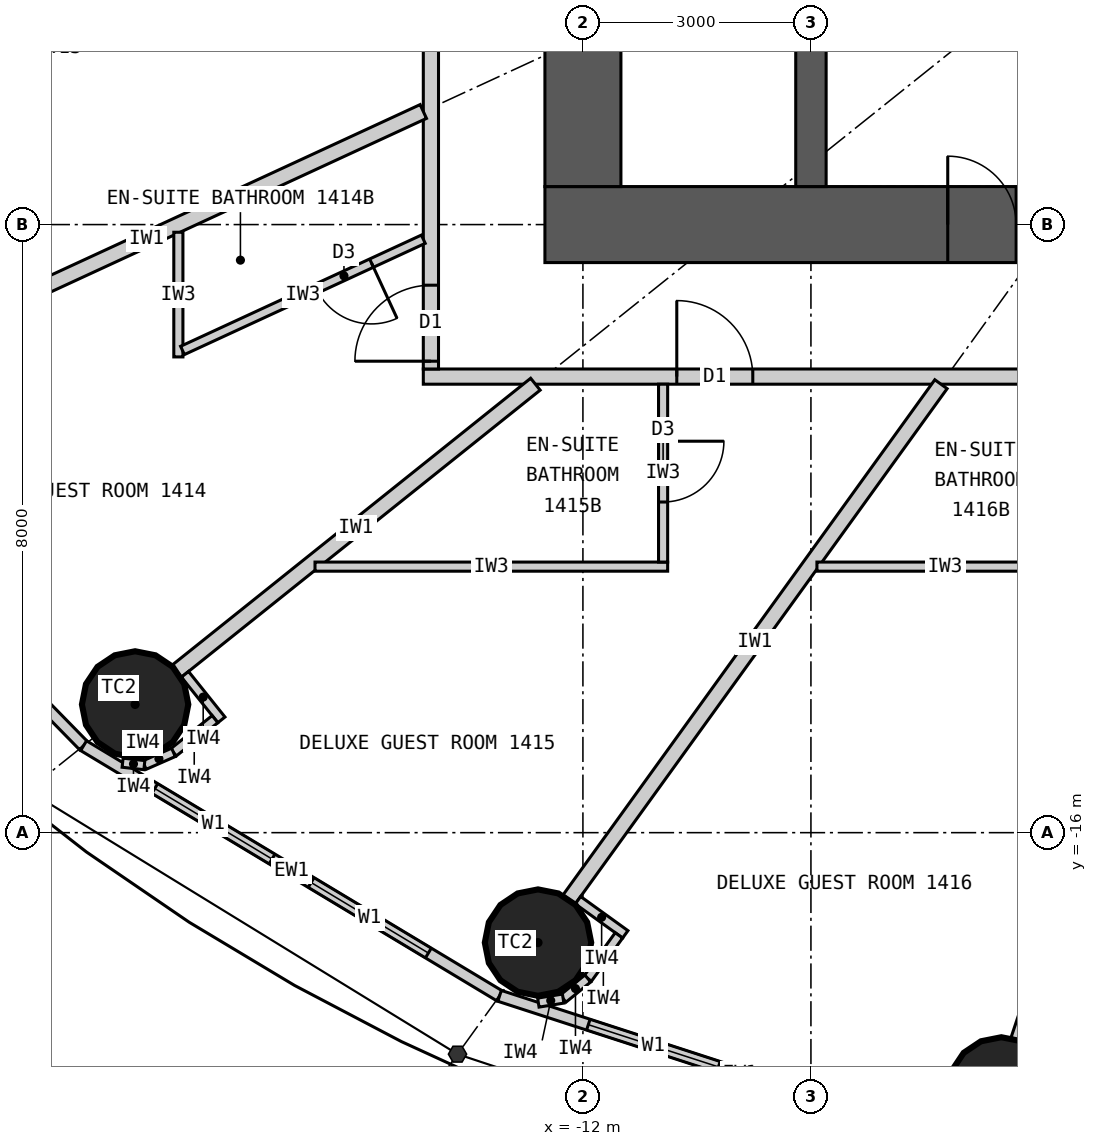
"""IFC4 building model, lengths in metres.
Left out: names, types, materials, properties, quantities, classifications, styles, units other than length and angle.
Written with IfcOpenShell. Run it as: python <this file> out.ifc"""

import sys

from ifc_helpers import new_model, si_unit, direction, frame, frame_2d, origin, origin_2d, place, context, subcontext, project, spatial, rectangle, circle, extrude, element, fill, save


model = new_model("IFC4")
c1 = context("Model", 3, precision=1e-05, world=origin(), true_north=direction((0.0, 1.0)))
c2 = subcontext(c1, "Body", "Model", "MODEL_VIEW")
j1 = project(units=[si_unit("LENGTHUNIT", "METRE"), si_unit("PLANEANGLEUNIT", "RADIAN")], contexts=[c1])
p1 = place(None, origin())
s1 = spatial("IfcSite", under=j1, at=p1, CompositionType="ELEMENT")
p2 = place(p1, origin())
s2 = spatial("IfcBuilding", under=s1, at=p2, CompositionType="ELEMENT")
p3 = place(p2, frame((0.0, 0.0, 60.6)))
s3 = spatial("IfcBuildingStorey", under=s2, at=p3, CompositionType="ELEMENT", Elevation=60.6)
for number, where, z_axis, x_axis in (
    (1, (-17.892, -14.313, 0.0), (0.0, 0.0, 1.0), (1.0, 0.0, 0.0)),
    (2, (-12.591, -17.447, 0.0), (0.0, 0.0, 1.0), (1.0, 0.0, 0.0)),
    (3, (-6.495, -19.391, 0.0), (0.0, 0.0, 1.0), (1.0, 0.0, 0.0)),
):
    element("IfcColumn", number, at=place(p3, frame(where, z_axis=z_axis, x_axis=x_axis)), inside=s3, PredefinedType="COLUMN", context=c2, shape_type="SweptSolid", body=[
        extrude(circle(Radius=0.7, at=origin_2d()), origin(), (0.0, 0.0, 1.0), 3.3),
    ])
p4 = place(p3, frame((12.5, -8.0, 0.0), z_axis=(0.0, 0.0, 1.0), x_axis=(-1.0, 0.0, 0.0)))
e4 = element("IfcWall", 4, at=p4, inside=s3, PredefinedType="SHEAR", context=c2, shape_type="SweptSolid", body=[
    extrude(rectangle(XDim=25.0, YDim=1.0, at=frame_2d((12.5, 0.0))), origin(), (0.0, 0.0, 1.0), 3.3),
])
p5 = place(p4, frame((11.2, 0.0, 0.0)))
e5 = element("IfcOpeningElement", 5, at=p5, cuts=e4, PredefinedType="OPENING", context=c2, shape_type="SweptSolid", body=[
    extrude(rectangle(XDim=1.2, YDim=2.2, at=frame_2d((0.6, 1.1))), frame((0.0, 0.51, 0.0), z_axis=(0.0, -1.0, 0.0), x_axis=(1.0, 0.0, 0.0)), (0.0, 0.0, 1.0), 1.02),
])
p6 = place(p4, frame((18.8, 0.0, 0.0)))
e6 = element("IfcOpeningElement", 6, at=p6, cuts=e4, PredefinedType="OPENING", context=c2, shape_type="SweptSolid", body=[
    extrude(rectangle(XDim=0.9, YDim=2.2, at=frame_2d((0.45, 1.1))), frame((0.0, 0.51, 0.0), z_axis=(0.0, -1.0, 0.0), x_axis=(1.0, 0.0, 0.0)), (0.0, 0.0, 1.0), 1.02),
])
p7 = place(p3, frame((-12.0, 7.5, 0.0), z_axis=(0.0, 0.0, 1.0), x_axis=(0.0, -1.0, 0.0)))
e7 = element("IfcWall", 7, at=p7, inside=s3, PredefinedType="SHEAR", context=c2, shape_type="SweptSolid", body=[
    extrude(rectangle(XDim=15.0, YDim=1.0, at=frame_2d((7.5, 0.0))), origin(), (0.0, 0.0, 1.0), 3.3),
])
p8 = place(p7, frame((6.6, 0.0, 0.0)))
e8 = element("IfcOpeningElement", 8, at=p8, cuts=e7, PredefinedType="OPENING", context=c2, shape_type="SweptSolid", body=[
    extrude(rectangle(XDim=1.8, YDim=2.2, at=frame_2d((0.9, 1.1))), frame((0.0, 0.51, 0.0), z_axis=(0.0, -1.0, 0.0), x_axis=(1.0, 0.0, 0.0)), (0.0, 0.0, 1.0), 1.02),
])
p9 = place(p3, frame((-9.0, -7.5, 0.0), z_axis=(0.0, 0.0, 1.0), x_axis=(0.0, 1.0, 0.0)))
e9 = element("IfcWall", 9, at=p9, inside=s3, PredefinedType="SHEAR", context=c2, shape_type="SweptSolid", body=[
    extrude(rectangle(XDim=3.0, YDim=0.4, at=frame_2d((1.5, 0.0))), origin(), (0.0, 0.0, 1.0), 3.3),
])
p10 = place(p3, frame((-22.803, -10.532, 0.0), z_axis=(0.0, 0.0, 1.0), x_axis=(0.699602905915, -0.714531856557, 0.0)))
e10 = element("IfcWall", 10, at=p10, inside=s3, PredefinedType="ELEMENTEDWALL", context=c2, shape_type="SweptSolid", body=[
    extrude(rectangle(XDim=6.051, YDim=0.15, at=frame_2d((3.025, 0.0))), origin(), (0.0, 0.0, 1.0), 3.12),
])
p11 = place(p10, frame((0.926, 0.0, 0.9)))
e11 = element("IfcOpeningElement", 11, at=p11, cuts=e10, PredefinedType="OPENING", context=c2, shape_type="SweptSolid", body=[
    extrude(rectangle(XDim=1.8, YDim=1.9, at=frame_2d((0.9, 0.95))), frame((0.0, 0.085, 0.0), z_axis=(0.0, -1.0, 0.0), x_axis=(1.0, 0.0, 0.0)), (0.0, 0.0, 1.0), 0.17),
])
p12 = place(p10, frame((3.325, 0.0, 0.9)))
e12 = element("IfcOpeningElement", 12, at=p12, cuts=e10, PredefinedType="OPENING", context=c2, shape_type="SweptSolid", body=[
    extrude(rectangle(XDim=1.8, YDim=1.9, at=frame_2d((0.9, 0.95))), frame((0.0, 0.085, 0.0), z_axis=(0.0, -1.0, 0.0), x_axis=(1.0, 0.0, 0.0)), (0.0, 0.0, 1.0), 0.17),
])
p13 = place(p3, frame((-18.57, -14.856, 0.0), z_axis=(0.0, 0.0, 1.0), x_axis=(0.856983180864, -0.515344377787, 0.0)))
e13 = element("IfcWall", 13, at=p13, inside=s3, PredefinedType="ELEMENTEDWALL", context=c2, shape_type="SweptSolid", body=[
    extrude(rectangle(XDim=6.386, YDim=0.15, at=frame_2d((3.193, 0.0))), origin(), (0.0, 0.0, 1.0), 3.12),
])
p14 = place(p13, frame((1.093, 0.0, 0.9)))
e14 = element("IfcOpeningElement", 14, at=p14, cuts=e13, PredefinedType="OPENING", context=c2, shape_type="SweptSolid", body=[
    extrude(rectangle(XDim=1.8, YDim=1.9, at=frame_2d((0.9, 0.95))), frame((0.0, 0.085, 0.0), z_axis=(0.0, -1.0, 0.0), x_axis=(1.0, 0.0, 0.0)), (0.0, 0.0, 1.0), 0.17),
])
p15 = place(p13, frame((3.493, 0.0, 0.9)))
e15 = element("IfcOpeningElement", 15, at=p15, cuts=e13, PredefinedType="OPENING", context=c2, shape_type="SweptSolid", body=[
    extrude(rectangle(XDim=1.8, YDim=1.9, at=frame_2d((0.9, 0.95))), frame((0.0, 0.085, 0.0), z_axis=(0.0, -1.0, 0.0), x_axis=(1.0, 0.0, 0.0)), (0.0, 0.0, 1.0), 0.17),
])
p16 = place(p3, frame((-13.096, -18.147, 0.0), z_axis=(0.0, 0.0, 1.0), x_axis=(0.951137534625, -0.308767534285, 0.0)))
e16 = element("IfcWall", 16, at=p16, inside=s3, PredefinedType="ELEMENTEDWALL", context=c2, shape_type="SweptSolid", body=[
    extrude(rectangle(XDim=6.655, YDim=0.15, at=frame_2d((3.328, 0.0))), origin(), (0.0, 0.0, 1.0), 3.12),
])
p17 = place(p16, frame((1.228, 0.0, 0.9)))
e17 = element("IfcOpeningElement", 17, at=p17, cuts=e16, PredefinedType="OPENING", context=c2, shape_type="SweptSolid", body=[
    extrude(rectangle(XDim=1.8, YDim=1.9, at=frame_2d((0.9, 0.95))), frame((0.0, 0.085, 0.0), z_axis=(0.0, -1.0, 0.0), x_axis=(1.0, 0.0, 0.0)), (0.0, 0.0, 1.0), 0.17),
])
p18 = place(p16, frame((3.628, 0.0, 0.9)))
e18 = element("IfcOpeningElement", 18, at=p18, cuts=e16, PredefinedType="OPENING", context=c2, shape_type="SweptSolid", body=[
    extrude(rectangle(XDim=1.8, YDim=1.9, at=frame_2d((0.9, 0.95))), frame((0.0, 0.085, 0.0), z_axis=(0.0, -1.0, 0.0), x_axis=(1.0, 0.0, 0.0)), (0.0, 0.0, 1.0), 0.17),
])
p19 = place(p3, frame((14.1, -10.0, 0.0), z_axis=(0.0, 0.0, 1.0), x_axis=(-1.0, 0.0, 0.0)))
e19 = element("IfcWall", 19, at=p19, inside=s3, PredefinedType="PARTITIONING", context=c2, shape_type="SweptSolid", body=[
    extrude(rectangle(XDim=28.2, YDim=0.2, at=frame_2d((14.1, 0.0))), origin(), (0.0, 0.0, 1.0), 3.12),
])
p20 = place(p19, frame((23.865, 0.0, 0.0)))
e20 = element("IfcOpeningElement", 20, at=p20, cuts=e19, PredefinedType="OPENING", context=c2, shape_type="SweptSolid", body=[
    extrude(rectangle(XDim=1.0, YDim=2.2, at=frame_2d((0.5, 1.1))), frame((0.0, 0.11, 0.0), z_axis=(0.0, -1.0, 0.0), x_axis=(1.0, 0.0, 0.0)), (0.0, 0.0, 1.0), 0.22),
])
p21 = place(p19, frame((18.529, 0.0, 0.0)))
e21 = element("IfcOpeningElement", 21, at=p21, cuts=e19, PredefinedType="OPENING", context=c2, shape_type="SweptSolid", body=[
    extrude(rectangle(XDim=1.0, YDim=2.2, at=frame_2d((0.5, 1.1))), frame((0.0, 0.11, 0.0), z_axis=(0.0, -1.0, 0.0), x_axis=(1.0, 0.0, 0.0)), (0.0, 0.0, 1.0), 0.22),
])
p22 = place(p19, frame((14.623, 0.0, 0.0)))
e22 = element("IfcOpeningElement", 22, at=p22, cuts=e19, PredefinedType="OPENING", context=c2, shape_type="SweptSolid", body=[
    extrude(rectangle(XDim=1.0, YDim=2.2, at=frame_2d((0.5, 1.1))), frame((0.0, 0.11, 0.0), z_axis=(0.0, -1.0, 0.0), x_axis=(1.0, 0.0, 0.0)), (0.0, 0.0, 1.0), 0.22),
])
p23 = place(p19, frame((11.24, 0.0, 0.0)))
e23 = element("IfcOpeningElement", 23, at=p23, cuts=e19, PredefinedType="OPENING", context=c2, shape_type="SweptSolid", body=[
    extrude(rectangle(XDim=1.0, YDim=2.2, at=frame_2d((0.5, 1.1))), frame((0.0, 0.11, 0.0), z_axis=(0.0, -1.0, 0.0), x_axis=(1.0, 0.0, 0.0)), (0.0, 0.0, 1.0), 0.22),
])
p24 = place(p19, frame((8.671, 0.0, 0.0)))
e24 = element("IfcOpeningElement", 24, at=p24, cuts=e19, PredefinedType="OPENING", context=c2, shape_type="SweptSolid", body=[
    extrude(rectangle(XDim=1.0, YDim=2.2, at=frame_2d((0.5, 1.1))), frame((0.0, 0.11, 0.0), z_axis=(0.0, -1.0, 0.0), x_axis=(1.0, 0.0, 0.0)), (0.0, 0.0, 1.0), 0.22),
])
p25 = place(p19, frame((2.801, 0.0, 0.0)))
e25 = element("IfcOpeningElement", 25, at=p25, cuts=e19, PredefinedType="OPENING", context=c2, shape_type="SweptSolid", body=[
    extrude(rectangle(XDim=1.0, YDim=2.2, at=frame_2d((0.5, 1.1))), frame((0.0, 0.11, 0.0), z_axis=(0.0, -1.0, 0.0), x_axis=(1.0, 0.0, 0.0)), (0.0, 0.0, 1.0), 0.22),
])
p26 = place(p3, frame((-14.0, 9.9, 0.0), z_axis=(0.0, 0.0, 1.0), x_axis=(0.0, -1.0, 0.0)))
e26 = element("IfcWall", 26, at=p26, inside=s3, PredefinedType="PARTITIONING", context=c2, shape_type="SweptSolid", body=[
    extrude(rectangle(XDim=19.8, YDim=0.2, at=frame_2d((9.9, 0.0))), origin(), (0.0, 0.0, 1.0), 3.12),
])
p27 = place(p26, frame((0.103, 0.0, 0.0)))
e27 = element("IfcOpeningElement", 27, at=p27, cuts=e26, PredefinedType="OPENING", context=c2, shape_type="SweptSolid", body=[
    extrude(rectangle(XDim=1.0, YDim=2.2, at=frame_2d((0.5, 1.1))), frame((0.0, 0.11, 0.0), z_axis=(0.0, -1.0, 0.0), x_axis=(1.0, 0.0, 0.0)), (0.0, 0.0, 1.0), 0.22),
])
p28 = place(p26, frame((5.248, 0.0, 0.0)))
e28 = element("IfcOpeningElement", 28, at=p28, cuts=e26, PredefinedType="OPENING", context=c2, shape_type="SweptSolid", body=[
    extrude(rectangle(XDim=1.0, YDim=2.2, at=frame_2d((0.5, 1.1))), frame((0.0, 0.11, 0.0), z_axis=(0.0, -1.0, 0.0), x_axis=(1.0, 0.0, 0.0)), (0.0, 0.0, 1.0), 0.22),
])
p29 = place(p26, frame((9.438, 0.0, 0.0)))
e29 = element("IfcOpeningElement", 29, at=p29, cuts=e26, PredefinedType="OPENING", context=c2, shape_type="SweptSolid", body=[
    extrude(rectangle(XDim=1.0, YDim=2.2, at=frame_2d((0.5, 1.1))), frame((0.0, 0.11, 0.0), z_axis=(0.0, -1.0, 0.0), x_axis=(1.0, 0.0, 0.0)), (0.0, 0.0, 1.0), 0.22),
])
p30 = place(p26, frame((13.942, 0.0, 0.0)))
e30 = element("IfcOpeningElement", 30, at=p30, cuts=e26, PredefinedType="OPENING", context=c2, shape_type="SweptSolid", body=[
    extrude(rectangle(XDim=1.0, YDim=2.2, at=frame_2d((0.5, 1.1))), frame((0.0, 0.11, 0.0), z_axis=(0.0, -1.0, 0.0), x_axis=(1.0, 0.0, 0.0)), (0.0, 0.0, 1.0), 0.22),
])
p31 = place(p26, frame((18.698, 0.0, 0.0)))
e31 = element("IfcOpeningElement", 31, at=p31, cuts=e26, PredefinedType="OPENING", context=c2, shape_type="SweptSolid", body=[
    extrude(rectangle(XDim=1.0, YDim=2.2, at=frame_2d((0.5, 1.1))), frame((0.0, 0.11, 0.0), z_axis=(0.0, -1.0, 0.0), x_axis=(1.0, 0.0, 0.0)), (0.0, 0.0, 1.0), 0.22),
])
p32 = place(p3, frame((-14.1, -6.512, 0.0), z_axis=(0.0, 0.0, 1.0), x_axis=(-0.907832871056, -0.419332181247, 0.0)))
e32 = element("IfcWall", 32, at=p32, inside=s3, PredefinedType="PARTITIONING", context=c2, shape_type="SweptSolid", body=[
    extrude(rectangle(XDim=8.023, YDim=0.2, at=frame_2d((4.011, 0.0))), origin(), (0.0, 0.0, 1.0), 2.32),
])
p33 = place(p3, frame((-12.625, -10.1, 0.0), z_axis=(0.0, 0.0, 1.0), x_axis=(-0.780892451574, -0.624665493744, 0.0)))
e33 = element("IfcWall", 33, at=p33, inside=s3, PredefinedType="PARTITIONING", context=c2, shape_type="SweptSolid", body=[
    extrude(rectangle(XDim=6.045, YDim=0.2, at=frame_2d((3.022, 0.0))), origin(), (0.0, 0.0, 1.0), 2.32),
])
p34 = place(p3, frame((-7.289, -10.1, 0.0), z_axis=(0.0, 0.0, 1.0), x_axis=(-0.585198353053, -0.810890182197, 0.0)))
e34 = element("IfcWall", 34, at=p34, inside=s3, PredefinedType="PARTITIONING", context=c2, shape_type="SweptSolid", body=[
    extrude(rectangle(XDim=8.36, YDim=0.2, at=frame_2d((4.18, 0.0))), origin(), (0.0, 0.0, 1.0), 2.32),
])
p35 = place(p3, frame((-3.383, -10.1, 0.0), z_axis=(0.0, 0.0, 1.0), x_axis=(-0.31759592231, -0.948226149256, 0.0)))
e35 = element("IfcWall", 35, at=p35, inside=s3, PredefinedType="PARTITIONING", context=c2, shape_type="SweptSolid", body=[
    extrude(rectangle(XDim=9.098, YDim=0.2, at=frame_2d((4.549, 0.0))), origin(), (0.0, 0.0, 1.0), 2.32),
])
p36 = place(p3, frame((-17.323, -8.101, 0.0), z_axis=(0.0, 0.0, 1.0), x_axis=(0.0, -1.0, 0.0)))
e36 = element("IfcWall", 36, at=p36, inside=s3, PredefinedType="PARTITIONING", context=c2, shape_type="SweptSolid", body=[
    extrude(rectangle(XDim=1.64, YDim=0.12, at=frame_2d((0.82, 0.0))), origin(), (0.0, 0.0, 1.0), 3.12),
])
p37 = place(p3, frame((-14.1, -8.193, 0.0), z_axis=(0.0, 0.0, 1.0), x_axis=(-0.907836493557, -0.419324338628, 0.0)))
e37 = element("IfcWall", 37, at=p37, inside=s3, PredefinedType="PARTITIONING", context=c2, shape_type="SweptSolid", body=[
    extrude(rectangle(XDim=3.49, YDim=0.12, at=frame_2d((1.745, 0.0))), origin(), (0.0, 0.0, 1.0), 3.12),
])
p38 = place(p37, frame((0.75, 0.0, 0.0)))
e38 = element("IfcOpeningElement", 38, at=p38, cuts=e37, PredefinedType="OPENING", context=c2, shape_type="SweptSolid", body=[
    extrude(rectangle(XDim=0.8, YDim=2.1, at=frame_2d((0.4, 1.05))), frame((0.0, 0.07, 0.0), z_axis=(0.0, -1.0, 0.0), x_axis=(1.0, 0.0, 0.0)), (0.0, 0.0, 1.0), 0.14),
])
p39 = place(p3, frame((-15.525, -12.5, 0.0), z_axis=(0.0, 0.0, 1.0), x_axis=(1.0, 0.0, 0.0)))
e39 = element("IfcWall", 39, at=p39, inside=s3, PredefinedType="PARTITIONING", context=c2, shape_type="SweptSolid", body=[
    extrude(rectangle(XDim=4.64, YDim=0.12, at=frame_2d((2.32, 0.0))), origin(), (0.0, 0.0, 1.0), 3.12),
])
p40 = place(p3, frame((-10.945, -10.1, 0.0), z_axis=(0.0, 0.0, 1.0), x_axis=(0.0, -1.0, 0.0)))
e40 = element("IfcWall", 40, at=p40, inside=s3, PredefinedType="PARTITIONING", context=c2, shape_type="SweptSolid", body=[
    extrude(rectangle(XDim=2.34, YDim=0.12, at=frame_2d((1.17, 0.0))), origin(), (0.0, 0.0, 1.0), 3.12),
])
p41 = place(p40, frame((0.75, 0.0, 0.0)))
e41 = element("IfcOpeningElement", 41, at=p41, cuts=e40, PredefinedType="OPENING", context=c2, shape_type="SweptSolid", body=[
    extrude(rectangle(XDim=0.8, YDim=2.1, at=frame_2d((0.4, 1.05))), frame((0.0, 0.07, 0.0), z_axis=(0.0, -1.0, 0.0), x_axis=(1.0, 0.0, 0.0)), (0.0, 0.0, 1.0), 0.14),
])
p42 = place(p3, frame((-8.921, -12.5, 0.0), z_axis=(0.0, 0.0, 1.0), x_axis=(1.0, 0.0, 0.0)))
e42 = element("IfcWall", 42, at=p42, inside=s3, PredefinedType="PARTITIONING", context=c2, shape_type="SweptSolid", body=[
    extrude(rectangle(XDim=3.372, YDim=0.12, at=frame_2d((1.686, 0.0))), origin(), (0.0, 0.0, 1.0), 3.12),
])
p43 = place(p3, frame((-17.236, -13.917, 0.0), z_axis=(0.0, 0.0, 1.0), x_axis=(0.624695047554, -0.780868809443, 0.0)))
e43 = element("IfcWall", 43, at=p43, inside=s3, PredefinedType="PARTITIONING", context=c2, shape_type="SweptSolid", body=[
    extrude(rectangle(XDim=0.768, YDim=0.12, at=frame_2d((0.384, 0.0))), origin(), (0.0, 0.0, 1.0), 3.12),
])
p44 = place(p3, frame((-16.841, -14.507, 0.0), z_axis=(0.0, 0.0, 1.0), x_axis=(-0.780902834923, -0.62465251333, 0.0)))
e44 = element("IfcWall", 44, at=p44, inside=s3, PredefinedType="PARTITIONING", context=c2, shape_type="SweptSolid", body=[
    extrude(rectangle(XDim=0.7, YDim=0.12, at=frame_2d((0.35, 0.0))), origin(), (0.0, 0.0, 1.0), 3.12),
])
p45 = place(p3, frame((-17.387, -14.944, 0.0), z_axis=(0.0, 0.0, 1.0), x_axis=(-0.916036698064, -0.401094462441, 0.0)))
e45 = element("IfcWall", 45, at=p45, inside=s3, PredefinedType="PARTITIONING", context=c2, shape_type="SweptSolid", body=[
    extrude(rectangle(XDim=0.418, YDim=0.12, at=frame_2d((0.209, 0.0))), origin(), (0.0, 0.0, 1.0), 3.12),
])
p46 = place(p3, frame((-17.77, -15.112, 0.0), z_axis=(0.0, 0.0, 1.0), x_axis=(-0.993904401174, 0.110245368731, 0.0)))
e46 = element("IfcWall", 46, at=p46, inside=s3, PredefinedType="PARTITIONING", context=c2, shape_type="SweptSolid", body=[
    extrude(rectangle(XDim=0.288, YDim=0.12, at=frame_2d((0.144, 0.0))), origin(), (0.0, 0.0, 1.0), 3.12),
])
p47 = place(p3, frame((-12.065, -16.889, 0.0), z_axis=(0.0, 0.0, 1.0), x_axis=(0.810821798253, -0.585293098778, 0.0)))
e47 = element("IfcWall", 47, at=p47, inside=s3, PredefinedType="PARTITIONING", context=c2, shape_type="SweptSolid", body=[
    extrude(rectangle(XDim=0.768, YDim=0.12, at=frame_2d((0.384, 0.0))), origin(), (0.0, 0.0, 1.0), 3.12),
])
p48 = place(p3, frame((-11.526, -17.351, 0.0), z_axis=(0.0, 0.0, 1.0), x_axis=(-0.585223113993, -0.810872312296, 0.0)))
e48 = element("IfcWall", 48, at=p48, inside=s3, PredefinedType="PARTITIONING", context=c2, shape_type="SweptSolid", body=[
    extrude(rectangle(XDim=0.7, YDim=0.12, at=frame_2d((0.35, 0.0))), origin(), (0.0, 0.0, 1.0), 3.12),
])
p49 = place(p3, frame((-11.936, -17.919, 0.0), z_axis=(0.0, 0.0, 1.0), x_axis=(-0.775023088441, -0.631932917629, 0.0)))
e49 = element("IfcWall", 49, at=p49, inside=s3, PredefinedType="PARTITIONING", context=c2, shape_type="SweptSolid", body=[
    extrude(rectangle(XDim=0.418, YDim=0.12, at=frame_2d((0.209, 0.0))), origin(), (0.0, 0.0, 1.0), 3.12),
])
p50 = place(p3, frame((-12.26, -18.183, 0.0), z_axis=(0.0, 0.0, 1.0), x_axis=(-0.987218661664, -0.159371622511, 0.0)))
e50 = element("IfcWall", 50, at=p50, inside=s3, PredefinedType="PARTITIONING", context=c2, shape_type="SweptSolid", body=[
    extrude(rectangle(XDim=0.331, YDim=0.12, at=frame_2d((0.166, 0.0))), origin(), (0.0, 0.0, 1.0), 3.12),
])
p51 = place(p14, origin())
e51 = element("IfcWindow", 51, at=p51, inside=s3, PartitioningType="SINGLE_PANEL", PredefinedType="WINDOW", context=c2, shape_type="SweptSolid", body=[
    extrude(rectangle(XDim=1.8, YDim=1.9, at=frame_2d((0.9, 0.95))), frame((0.0, 0.03, 0.0), z_axis=(0.0, -1.0, 0.0), x_axis=(1.0, 0.0, 0.0)), (0.0, 0.0, 1.0), 0.06),
])
fill(e14, e51)
p52 = place(p15, origin())
e52 = element("IfcWindow", 52, at=p52, inside=s3, PartitioningType="SINGLE_PANEL", PredefinedType="WINDOW", context=c2, shape_type="SweptSolid", body=[
    extrude(rectangle(XDim=1.8, YDim=1.9, at=frame_2d((0.9, 0.95))), frame((0.0, 0.03, 0.0), z_axis=(0.0, -1.0, 0.0), x_axis=(1.0, 0.0, 0.0)), (0.0, 0.0, 1.0), 0.06),
])
fill(e15, e52)
p53 = place(p17, origin())
e53 = element("IfcWindow", 53, at=p53, inside=s3, PartitioningType="SINGLE_PANEL", PredefinedType="WINDOW", context=c2, shape_type="SweptSolid", body=[
    extrude(rectangle(XDim=1.8, YDim=1.9, at=frame_2d((0.9, 0.95))), frame((0.0, 0.03, 0.0), z_axis=(0.0, -1.0, 0.0), x_axis=(1.0, 0.0, 0.0)), (0.0, 0.0, 1.0), 0.06),
])
fill(e17, e53)
p54 = place(p38, origin())
e54 = element("IfcDoor", 54, at=p54, inside=s3, OperationType="SINGLE_SWING_LEFT", PredefinedType="DOOR", context=c2, shape_type="SweptSolid", body=[
    extrude(rectangle(XDim=0.8, YDim=2.1, at=frame_2d((0.4, 1.05))), frame((0.0, 0.025, 0.0), z_axis=(0.0, -1.0, 0.0), x_axis=(1.0, 0.0, 0.0)), (0.0, 0.0, 1.0), 0.05),
])
fill(e38, e54)
p55 = place(p31, origin())
e55 = element("IfcDoor", 55, at=p55, inside=s3, OperationType="SINGLE_SWING_RIGHT", PredefinedType="DOOR", context=c2, shape_type="SweptSolid", body=[
    extrude(rectangle(XDim=1.0, YDim=2.2, at=frame_2d((0.5, 1.1))), frame((0.0, 0.025, 0.0), z_axis=(0.0, -1.0, 0.0), x_axis=(1.0, 0.0, 0.0)), (0.0, 0.0, 1.0), 0.05),
])
fill(e31, e55)
p56 = place(p41, origin())
e56 = element("IfcDoor", 56, at=p56, inside=s3, OperationType="SINGLE_SWING_LEFT", PredefinedType="DOOR", context=c2, shape_type="SweptSolid", body=[
    extrude(rectangle(XDim=0.8, YDim=2.1, at=frame_2d((0.4, 1.05))), frame((0.0, 0.025, 0.0), z_axis=(0.0, -1.0, 0.0), x_axis=(1.0, 0.0, 0.0)), (0.0, 0.0, 1.0), 0.05),
])
fill(e41, e56)
p57 = place(p20, origin())
e57 = element("IfcDoor", 57, at=p57, inside=s3, OperationType="SINGLE_SWING_RIGHT", PredefinedType="DOOR", context=c2, shape_type="SweptSolid", body=[
    extrude(rectangle(XDim=1.0, YDim=2.2, at=frame_2d((0.5, 1.1))), frame((0.0, 0.025, 0.0), z_axis=(0.0, -1.0, 0.0), x_axis=(1.0, 0.0, 0.0)), (0.0, 0.0, 1.0), 0.05),
])
fill(e20, e57)
p58 = place(p6, origin())
e58 = element("IfcDoor", 58, at=p58, inside=s3, OperationType="SINGLE_SWING_RIGHT", PredefinedType="DOOR", context=c2, shape_type="SweptSolid", body=[
    extrude(rectangle(XDim=0.9, YDim=2.2, at=frame_2d((0.45, 1.1))), frame((0.0, 0.025, 0.0), z_axis=(0.0, -1.0, 0.0), x_axis=(1.0, 0.0, 0.0)), (0.0, 0.0, 1.0), 0.05),
])
fill(e6, e58)
save(model, sys.argv[1])
